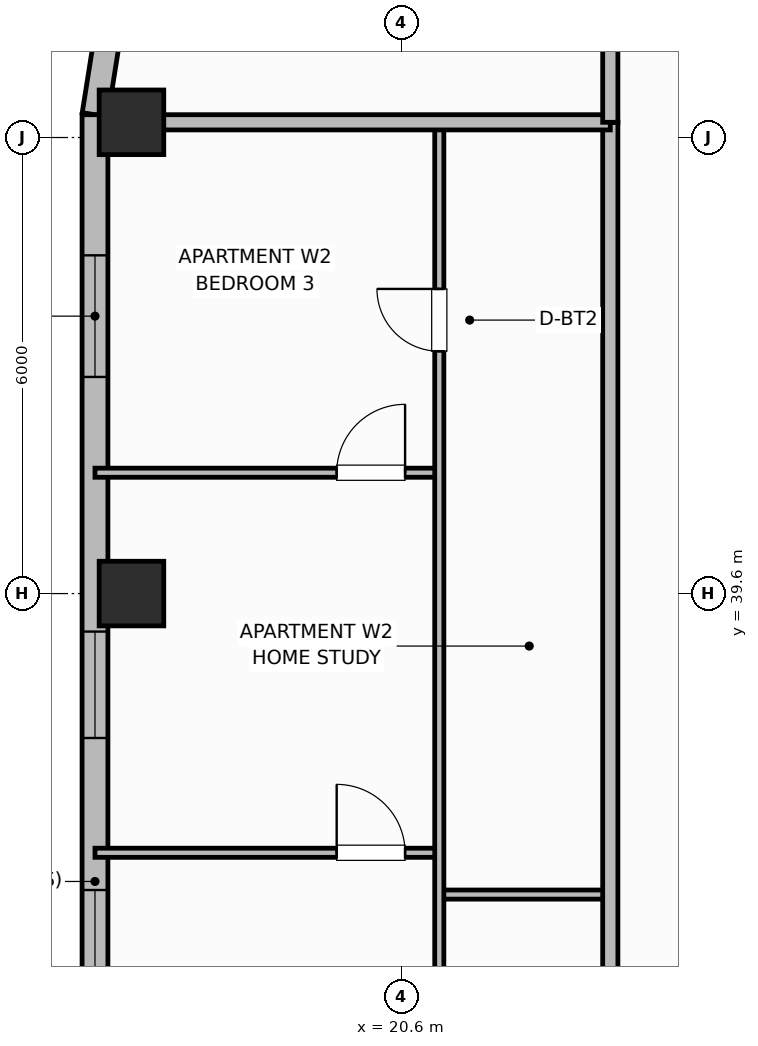
"""IFC4 building model, lengths in metres.
Left out: names, types, materials, properties, quantities, classifications, styles, units other than length and angle.
Written with IfcOpenShell. Run it as: python <this file> out.ifc"""

import sys

from ifc_helpers import new_model, si_unit, direction, frame, frame_2d, origin, origin_2d, place, context, subcontext, project, spatial, rectangle, extrude, element, fill, save


model = new_model("IFC4")
c1 = context("Model", 3, precision=1e-05, world=origin(), true_north=direction((0.0, 1.0)))
c2 = subcontext(c1, "Body", "Model", "MODEL_VIEW")
j1 = project(units=[si_unit("LENGTHUNIT", "METRE"), si_unit("PLANEANGLEUNIT", "RADIAN")], contexts=[c1])
p1 = place(None, origin())
s1 = spatial("IfcSite", under=j1, at=p1, CompositionType="ELEMENT")
p2 = place(p1, origin())
s2 = spatial("IfcBuilding", under=s1, at=p2, CompositionType="ELEMENT")
p3 = place(p2, frame((0.0, 0.0, 211.0)))
s3 = spatial("IfcBuildingStorey", under=s2, at=p3, CompositionType="ELEMENT", Elevation=211.0)
for number, where, z_axis, x_axis in (
    (1, (17.05, 39.6, 0.0), (0.0, 0.0, 1.0), (1.0, 0.0, 0.0)),
    (2, (17.05, 45.8, 0.0), (0.0, 0.0, 1.0), (1.0, 0.0, 0.0)),
):
    element("IfcColumn", number, at=place(p3, frame(where, z_axis=z_axis, x_axis=x_axis)), inside=s3, PredefinedType="COLUMN", context=c2, shape_type="SweptSolid", body=[
        extrude(rectangle(XDim=0.85, YDim=0.85, at=origin_2d()), origin(), (0.0, 0.0, 1.0), 3.7),
    ])
p4 = place(p3, frame((16.748, 47.022, 0.0), z_axis=(0.0, 0.0, 1.0), x_axis=(-0.156481329164, -0.987680916907, 0.0)))
e3 = element("IfcWall", 3, at=p4, inside=s3, PredefinedType="SOLIDWALL", context=c2, shape_type="SweptSolid", body=[
    extrude(rectangle(XDim=1.136, YDim=0.34, at=frame_2d((0.568, 0.0))), origin(), (0.0, 0.0, 1.0), 2.72),
])
p5 = place(p3, frame((16.57, 45.9, 0.0), z_axis=(0.0, 0.0, 1.0), x_axis=(0.0, -1.0, 0.0)))
e4 = element("IfcWall", 4, at=p5, inside=s3, PredefinedType="SOLIDWALL", context=c2, shape_type="SweptSolid", body=[
    extrude(rectangle(XDim=13.3, YDim=0.34, at=frame_2d((6.65, 0.0))), origin(), (0.0, 0.0, 1.0), 2.72),
])
p6 = place(p5, frame((1.85, 0.0, 0.7)))
e5 = element("IfcOpeningElement", 5, at=p6, cuts=e4, PredefinedType="OPENING", context=c2, shape_type="SweptSolid", body=[
    extrude(rectangle(XDim=1.6, YDim=1.9, at=frame_2d((0.8, 0.95))), frame((0.0, 0.18, 0.0), z_axis=(0.0, -1.0, 0.0), x_axis=(1.0, 0.0, 0.0)), (0.0, 0.0, 1.0), 0.36),
])
p7 = place(p5, frame((6.8, 0.0, 0.71)))
e6 = element("IfcOpeningElement", 6, at=p7, cuts=e4, PredefinedType="OPENING", context=c2, shape_type="SweptSolid", body=[
    extrude(rectangle(XDim=1.4, YDim=1.85, at=frame_2d((0.7, 0.925))), frame((0.0, 0.18, 0.0), z_axis=(0.0, -1.0, 0.0), x_axis=(1.0, 0.0, 0.0)), (0.0, 0.0, 1.0), 0.36),
])
p8 = place(p5, frame((10.2, 0.0, 0.7)))
e7 = element("IfcOpeningElement", 7, at=p8, cuts=e4, PredefinedType="OPENING", context=c2, shape_type="SweptSolid", body=[
    extrude(rectangle(XDim=1.6, YDim=1.9, at=frame_2d((0.8, 0.95))), frame((0.0, 0.18, 0.0), z_axis=(0.0, -1.0, 0.0), x_axis=(1.0, 0.0, 0.0)), (0.0, 0.0, 1.0), 0.36),
])
p9 = place(p3, frame((21.1, 35.64, 0.0), z_axis=(0.0, 0.0, 1.0), x_axis=(1.0, 0.0, 0.0)))
e8 = element("IfcWall", 8, at=p9, inside=s3, PredefinedType="PARTITIONING", context=c2, shape_type="SweptSolid", body=[
    extrude(rectangle(XDim=2.25, YDim=0.12, at=frame_2d((1.125, 0.0))), origin(), (0.0, 0.0, 1.0), 2.55),
])
p10 = place(p3, frame((16.57, 36.19, 0.0), z_axis=(0.0, 0.0, 1.0), x_axis=(1.0, 0.0, 0.0)))
e9 = element("IfcWall", 9, at=p10, inside=s3, PredefinedType="PARTITIONING", context=c2, shape_type="SweptSolid", body=[
    extrude(rectangle(XDim=4.53, YDim=0.12, at=frame_2d((2.265, 0.0))), origin(), (0.0, 0.0, 1.0), 2.55),
])
p11 = place(p10, frame((3.18, 0.0, 0.0)))
e10 = element("IfcOpeningElement", 10, at=p11, cuts=e9, PredefinedType="OPENING", context=c2, shape_type="SweptSolid", body=[
    extrude(rectangle(XDim=0.9, YDim=2.1, at=frame_2d((0.45, 1.05))), frame((0.0, 0.07, 0.0), z_axis=(0.0, -1.0, 0.0), x_axis=(1.0, 0.0, 0.0)), (0.0, 0.0, 1.0), 0.14),
])
p12 = place(p3, frame((16.57, 41.19, 0.0), z_axis=(0.0, 0.0, 1.0), x_axis=(1.0, 0.0, 0.0)))
e11 = element("IfcWall", 11, at=p12, inside=s3, PredefinedType="PARTITIONING", context=c2, shape_type="SweptSolid", body=[
    extrude(rectangle(XDim=4.53, YDim=0.12, at=frame_2d((2.265, 0.0))), origin(), (0.0, 0.0, 1.0), 2.55),
])
p13 = place(p12, frame((3.18, 0.0, 0.0)))
e12 = element("IfcOpeningElement", 12, at=p13, cuts=e11, PredefinedType="OPENING", context=c2, shape_type="SweptSolid", body=[
    extrude(rectangle(XDim=0.9, YDim=2.1, at=frame_2d((0.45, 1.05))), frame((0.0, 0.07, 0.0), z_axis=(0.0, -1.0, 0.0), x_axis=(1.0, 0.0, 0.0)), (0.0, 0.0, 1.0), 0.14),
])
p14 = place(p3, frame((21.1, 26.48, 0.0), z_axis=(0.0, 0.0, 1.0), x_axis=(0.0, 1.0, 0.0)))
e13 = element("IfcWall", 13, at=p14, inside=s3, PredefinedType="PARTITIONING", context=c2, shape_type="SweptSolid", body=[
    extrude(rectangle(XDim=19.28, YDim=0.12, at=frame_2d((9.64, 0.0))), origin(), (0.0, 0.0, 1.0), 2.55),
])
p15 = place(p14, frame((3.01, 0.0, 0.0)))
e14 = element("IfcOpeningElement", 14, at=p15, cuts=e13, PredefinedType="OPENING", context=c2, shape_type="SweptSolid", body=[
    extrude(rectangle(XDim=0.9, YDim=2.1, at=frame_2d((0.45, 1.05))), frame((0.0, 0.07, 0.0), z_axis=(0.0, -1.0, 0.0), x_axis=(1.0, 0.0, 0.0)), (0.0, 0.0, 1.0), 0.14),
])
p16 = place(p14, frame((16.308, 0.0, 0.0)))
e15 = element("IfcOpeningElement", 15, at=p16, cuts=e13, PredefinedType="OPENING", context=c2, shape_type="SweptSolid", body=[
    extrude(rectangle(XDim=0.82, YDim=2.08, at=frame_2d((0.41, 1.04))), frame((0.0, 0.07, 0.0), z_axis=(0.0, -1.0, 0.0), x_axis=(1.0, 0.0, 0.0)), (0.0, 0.0, 1.0), 0.14),
])
p17 = place(p3, frame((23.35, 10.6, 0.0), z_axis=(0.0, 0.0, 1.0), x_axis=(0.0, 1.0, 0.0)))
e16 = element("IfcWall", 16, at=p17, inside=s3, PredefinedType="PARTITIONING", context=c2, shape_type="SweptSolid", body=[
    extrude(rectangle(XDim=35.2, YDim=0.2, at=frame_2d((17.6, 0.0))), origin(), (0.0, 0.0, 1.0), 2.55),
])
p18 = place(p17, frame((2.65, 0.0, 0.0)))
e17 = element("IfcOpeningElement", 17, at=p18, cuts=e16, PredefinedType="OPENING", context=c2, shape_type="SweptSolid", body=[
    extrude(rectangle(XDim=1.0, YDim=2.15, at=frame_2d((0.5, 1.075))), frame((0.0, 0.11, 0.0), z_axis=(0.0, -1.0, 0.0), x_axis=(1.0, 0.0, 0.0)), (0.0, 0.0, 1.0), 0.22),
])
p19 = place(p17, frame((19.79, 0.0, 0.0)))
e18 = element("IfcOpeningElement", 18, at=p19, cuts=e16, PredefinedType="OPENING", context=c2, shape_type="SweptSolid", body=[
    extrude(rectangle(XDim=1.0, YDim=2.15, at=frame_2d((0.5, 1.075))), frame((0.0, 0.11, 0.0), z_axis=(0.0, -1.0, 0.0), x_axis=(1.0, 0.0, 0.0)), (0.0, 0.0, 1.0), 0.22),
])
p20 = place(p3, frame((16.99, 45.8, 0.0), z_axis=(0.0, 0.0, 1.0), x_axis=(1.0, 0.0, 0.0)))
e19 = element("IfcWall", 19, at=p20, inside=s3, PredefinedType="PARTITIONING", context=c2, shape_type="SweptSolid", body=[
    extrude(rectangle(XDim=6.36, YDim=0.2, at=frame_2d((3.18, 0.0))), origin(), (0.0, 0.0, 1.0), 2.55),
])
p21 = place(p3, frame((23.35, 45.8, 0.0), z_axis=(0.0, 0.0, 1.0), x_axis=(0.0, 1.0, 0.0)))
e20 = element("IfcWall", 20, at=p21, inside=s3, PredefinedType="PARTITIONING", context=c2, shape_type="SweptSolid", body=[
    extrude(rectangle(XDim=3.73, YDim=0.2, at=frame_2d((1.865, 0.0))), origin(), (0.0, 0.0, 1.0), 2.55),
])
p22 = place(p6, origin())
e21 = element("IfcWindow", 21, at=p22, inside=s3, PartitioningType="SINGLE_PANEL", PredefinedType="WINDOW", context=c2, shape_type="SweptSolid", body=[
    extrude(rectangle(XDim=1.6, YDim=1.9, at=frame_2d((0.8, 0.95))), frame((0.0, 0.03, 0.0), z_axis=(0.0, -1.0, 0.0), x_axis=(1.0, 0.0, 0.0)), (0.0, 0.0, 1.0), 0.06),
])
fill(e5, e21)
p23 = place(p7, origin())
e22 = element("IfcWindow", 22, at=p23, inside=s3, PartitioningType="SINGLE_PANEL", PredefinedType="WINDOW", context=c2, shape_type="SweptSolid", body=[
    extrude(rectangle(XDim=1.4, YDim=1.85, at=frame_2d((0.7, 0.925))), frame((0.0, 0.03, 0.0), z_axis=(0.0, -1.0, 0.0), x_axis=(1.0, 0.0, 0.0)), (0.0, 0.0, 1.0), 0.06),
])
fill(e6, e22)
p24 = place(p8, origin())
e23 = element("IfcWindow", 23, at=p24, inside=s3, PartitioningType="SINGLE_PANEL", PredefinedType="WINDOW", context=c2, shape_type="SweptSolid", body=[
    extrude(rectangle(XDim=1.6, YDim=1.9, at=frame_2d((0.8, 0.95))), frame((0.0, 0.03, 0.0), z_axis=(0.0, -1.0, 0.0), x_axis=(1.0, 0.0, 0.0)), (0.0, 0.0, 1.0), 0.06),
])
fill(e7, e23)
p25 = place(p11, origin())
e24 = element("IfcDoor", 24, at=p25, inside=s3, OperationType="SINGLE_SWING_LEFT", PredefinedType="DOOR", context=c2, shape_type="SweptSolid", body=[
    extrude(rectangle(XDim=0.9, YDim=2.1, at=frame_2d((0.45, 1.05))), frame((0.0, 0.025, 0.0), z_axis=(0.0, -1.0, 0.0), x_axis=(1.0, 0.0, 0.0)), (0.0, 0.0, 1.0), 0.05),
])
fill(e10, e24)
p26 = place(p13, origin())
e25 = element("IfcDoor", 25, at=p26, inside=s3, OperationType="SINGLE_SWING_RIGHT", PredefinedType="DOOR", context=c2, shape_type="SweptSolid", body=[
    extrude(rectangle(XDim=0.9, YDim=2.1, at=frame_2d((0.45, 1.05))), frame((0.0, 0.025, 0.0), z_axis=(0.0, -1.0, 0.0), x_axis=(1.0, 0.0, 0.0)), (0.0, 0.0, 1.0), 0.05),
])
fill(e12, e25)
p27 = place(p16, origin())
e26 = element("IfcDoor", 26, at=p27, inside=s3, OperationType="SINGLE_SWING_RIGHT", PredefinedType="DOOR", context=c2, shape_type="SweptSolid", body=[
    extrude(rectangle(XDim=0.82, YDim=2.08, at=frame_2d((0.41, 1.04))), frame((0.0, 0.025, 0.0), z_axis=(0.0, -1.0, 0.0), x_axis=(1.0, 0.0, 0.0)), (0.0, 0.0, 1.0), 0.05),
])
fill(e15, e26)
save(model, sys.argv[1])
